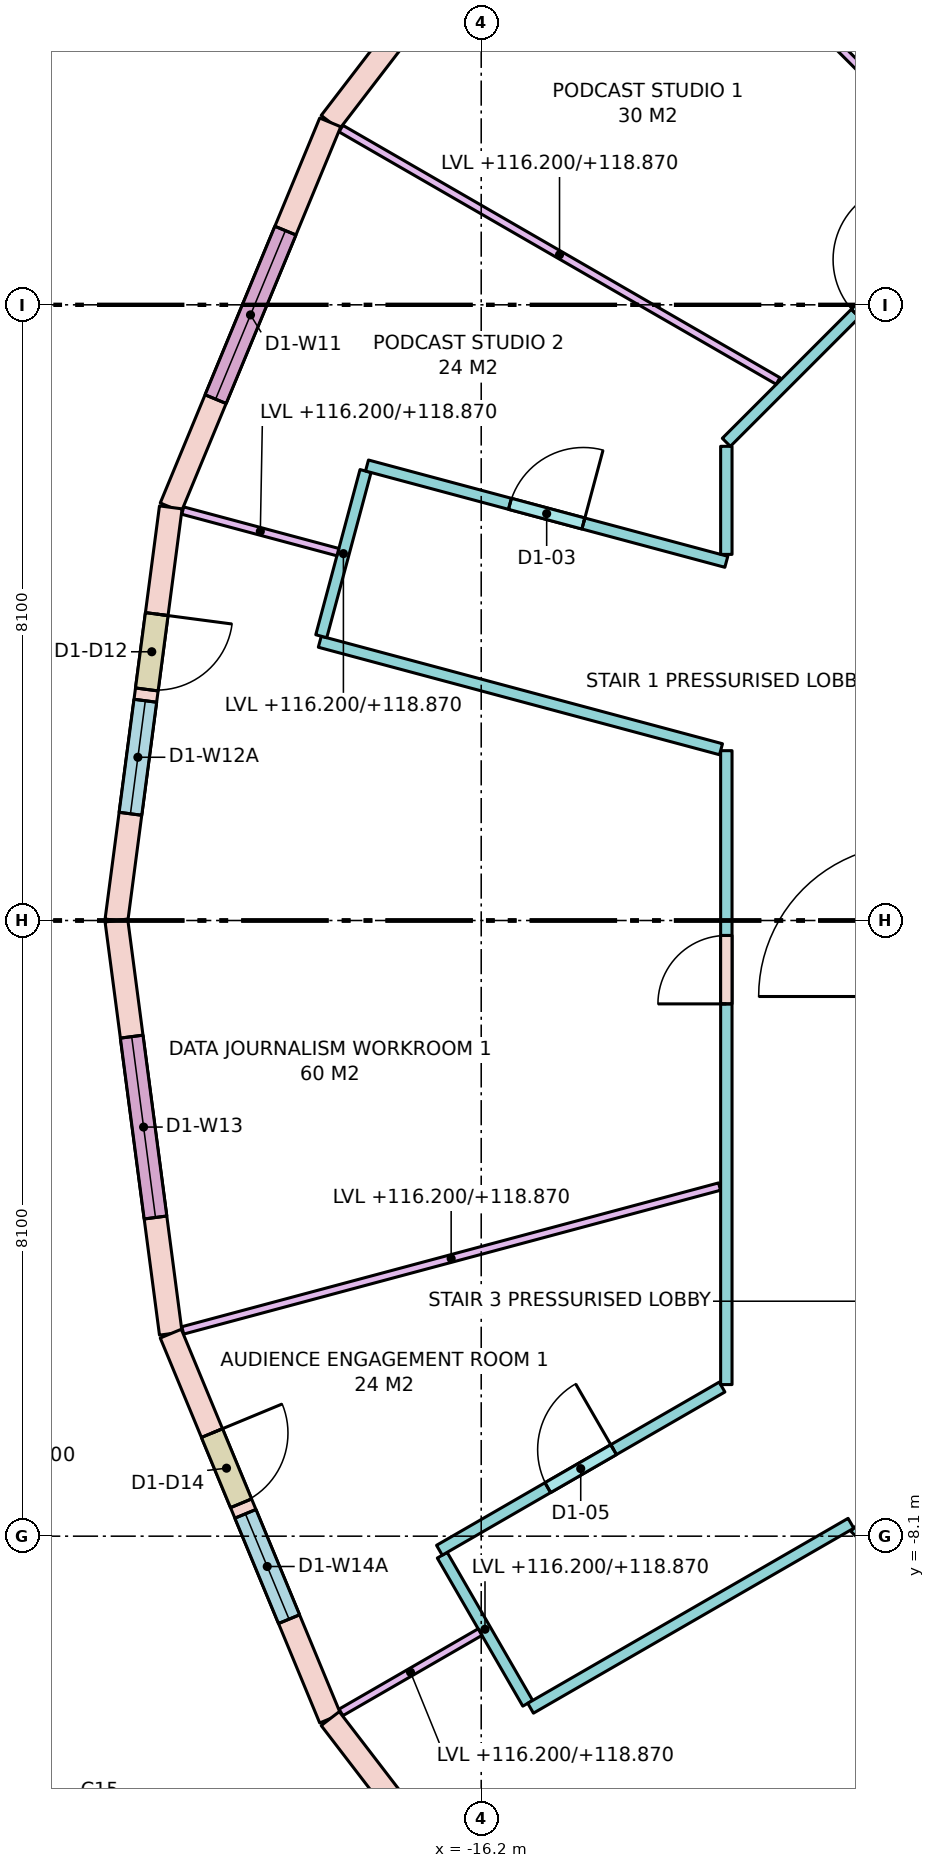
"""IFC4 building model, lengths in metres.
Left out: names, types, materials, properties, quantities, classifications, styles, units other than length and angle.
Written with IfcOpenShell. Run it as: python <this file> out.ifc"""

import sys

from ifc_helpers import new_model, si_unit, direction, frame, frame_2d, origin, place, context, subcontext, project, spatial, rectangle, extrude, element, fill, save


model = new_model("IFC4")
c1 = context("Model", 3, precision=1e-05, world=origin(), true_north=direction((0.0, 1.0)))
c2 = subcontext(c1, "Body", "Model", "MODEL_VIEW")
j1 = project(units=[si_unit("LENGTHUNIT", "METRE"), si_unit("PLANEANGLEUNIT", "RADIAN")], contexts=[c1])
p1 = place(None, origin())
s1 = spatial("IfcSite", under=j1, at=p1, CompositionType="ELEMENT")
p2 = place(p1, origin())
s2 = spatial("IfcBuilding", under=s1, at=p2, CompositionType="ELEMENT")
p3 = place(p2, frame((0.0, 0.0, 116.2)))
s3 = spatial("IfcBuildingStorey", under=s2, at=p3, CompositionType="ELEMENT", Elevation=116.2)
p4 = place(p3, frame((-14.849, 14.849, 0.0), z_axis=(0.0, 0.0, 1.0), x_axis=(-0.608784891166, -0.793335336593, 0.0)))
e1 = element("IfcWall", 1, at=p4, inside=s3, PredefinedType="STANDARD", context=c2, shape_type="SweptSolid", body=[
    extrude(rectangle(XDim=5.482, YDim=0.3, at=frame_2d((2.741, 0.0))), origin(), (0.0, 0.0, 1.0), 3.52),
])
p5 = place(p4, frame((1.416, 0.0, 0.0)))
e2 = element("IfcOpeningElement", 2, at=p5, cuts=e1, PredefinedType="OPENING", context=c2, shape_type="SweptSolid", body=[
    extrude(rectangle(XDim=1.0, YDim=2.4, at=frame_2d((0.5, 1.2))), frame((0.0, 0.16, 0.0), z_axis=(0.0, -1.0, 0.0), x_axis=(1.0, 0.0, 0.0)), (0.0, 0.0, 1.0), 0.32),
])
p6 = place(p4, frame((2.566, 0.0, 0.8)))
e3 = element("IfcOpeningElement", 3, at=p6, cuts=e1, PredefinedType="OPENING", context=c2, shape_type="SweptSolid", body=[
    extrude(rectangle(XDim=1.5, YDim=2.5, at=frame_2d((0.75, 1.25))), frame((0.0, 0.16, 0.0), z_axis=(0.0, -1.0, 0.0), x_axis=(1.0, 0.0, 0.0)), (0.0, 0.0, 1.0), 0.32),
])
p7 = place(p3, frame((-18.187, 10.5, 0.0), z_axis=(0.0, 0.0, 1.0), x_axis=(-0.382688740813, -0.923877333662, 0.0)))
e4 = element("IfcWall", 4, at=p7, inside=s3, PredefinedType="STANDARD", context=c2, shape_type="SweptSolid", body=[
    extrude(rectangle(XDim=5.482, YDim=0.3, at=frame_2d((2.741, 0.0))), origin(), (0.0, 0.0, 1.0), 3.52),
])
p8 = place(p7, frame((1.541, 0.0, 0.8)))
e5 = element("IfcOpeningElement", 5, at=p8, cuts=e4, PredefinedType="OPENING", context=c2, shape_type="SweptSolid", body=[
    extrude(rectangle(XDim=2.4, YDim=2.5, at=frame_2d((1.2, 1.25))), frame((0.0, 0.16, 0.0), z_axis=(0.0, -1.0, 0.0), x_axis=(1.0, 0.0, 0.0)), (0.0, 0.0, 1.0), 0.32),
])
p9 = place(p3, frame((-20.284, 5.435, 0.0), z_axis=(0.0, 0.0, 1.0), x_axis=(-0.130527087244, -0.991444743541, 0.0)))
e6 = element("IfcWall", 6, at=p9, inside=s3, PredefinedType="STANDARD", context=c2, shape_type="SweptSolid", body=[
    extrude(rectangle(XDim=5.482, YDim=0.3, at=frame_2d((2.741, 0.0))), origin(), (0.0, 0.0, 1.0), 3.52),
])
p10 = place(p9, frame((1.416, 0.0, 0.0)))
e7 = element("IfcOpeningElement", 7, at=p10, cuts=e6, PredefinedType="OPENING", context=c2, shape_type="SweptSolid", body=[
    extrude(rectangle(XDim=1.0, YDim=2.4, at=frame_2d((0.5, 1.2))), frame((0.0, 0.16, 0.0), z_axis=(0.0, -1.0, 0.0), x_axis=(1.0, 0.0, 0.0)), (0.0, 0.0, 1.0), 0.32),
])
p11 = place(p9, frame((2.566, 0.0, 0.8)))
e8 = element("IfcOpeningElement", 8, at=p11, cuts=e6, PredefinedType="OPENING", context=c2, shape_type="SweptSolid", body=[
    extrude(rectangle(XDim=1.5, YDim=2.5, at=frame_2d((0.75, 1.25))), frame((0.0, 0.16, 0.0), z_axis=(0.0, -1.0, 0.0), x_axis=(1.0, 0.0, 0.0)), (0.0, 0.0, 1.0), 0.32),
])
p12 = place(p3, frame((-21.0, 0.0, 0.0), z_axis=(0.0, 0.0, 1.0), x_axis=(0.130527087244, -0.991444743541, 0.0)))
e9 = element("IfcWall", 9, at=p12, inside=s3, PredefinedType="STANDARD", context=c2, shape_type="SweptSolid", body=[
    extrude(rectangle(XDim=5.482, YDim=0.3, at=frame_2d((2.741, 0.0))), origin(), (0.0, 0.0, 1.0), 3.52),
])
p13 = place(p12, frame((1.541, 0.0, 0.8)))
e10 = element("IfcOpeningElement", 10, at=p13, cuts=e9, PredefinedType="OPENING", context=c2, shape_type="SweptSolid", body=[
    extrude(rectangle(XDim=2.4, YDim=2.5, at=frame_2d((1.2, 1.25))), frame((0.0, 0.16, 0.0), z_axis=(0.0, -1.0, 0.0), x_axis=(1.0, 0.0, 0.0)), (0.0, 0.0, 1.0), 0.32),
])
p14 = place(p3, frame((-20.284, -5.435, 0.0), z_axis=(0.0, 0.0, 1.0), x_axis=(0.382688740813, -0.923877333662, 0.0)))
e11 = element("IfcWall", 11, at=p14, inside=s3, PredefinedType="STANDARD", context=c2, shape_type="SweptSolid", body=[
    extrude(rectangle(XDim=5.482, YDim=0.3, at=frame_2d((2.741, 0.0))), origin(), (0.0, 0.0, 1.0), 3.52),
])
p15 = place(p14, frame((1.416, 0.0, 0.0)))
e12 = element("IfcOpeningElement", 12, at=p15, cuts=e11, PredefinedType="OPENING", context=c2, shape_type="SweptSolid", body=[
    extrude(rectangle(XDim=1.0, YDim=2.4, at=frame_2d((0.5, 1.2))), frame((0.0, 0.16, 0.0), z_axis=(0.0, -1.0, 0.0), x_axis=(1.0, 0.0, 0.0)), (0.0, 0.0, 1.0), 0.32),
])
p16 = place(p14, frame((2.566, 0.0, 0.8)))
e13 = element("IfcOpeningElement", 13, at=p16, cuts=e11, PredefinedType="OPENING", context=c2, shape_type="SweptSolid", body=[
    extrude(rectangle(XDim=1.5, YDim=2.5, at=frame_2d((0.75, 1.25))), frame((0.0, 0.16, 0.0), z_axis=(0.0, -1.0, 0.0), x_axis=(1.0, 0.0, 0.0)), (0.0, 0.0, 1.0), 0.32),
])
p17 = place(p3, frame((-18.187, -10.5, 0.0), z_axis=(0.0, 0.0, 1.0), x_axis=(0.608784891166, -0.793335336593, 0.0)))
e14 = element("IfcWall", 14, at=p17, inside=s3, PredefinedType="STANDARD", context=c2, shape_type="SweptSolid", body=[
    extrude(rectangle(XDim=5.482, YDim=0.3, at=frame_2d((2.741, 0.0))), origin(), (0.0, 0.0, 1.0), 3.52),
])
p18 = place(p17, frame((1.541, 0.0, 0.8)))
e15 = element("IfcOpeningElement", 15, at=p18, cuts=e14, PredefinedType="OPENING", context=c2, shape_type="SweptSolid", body=[
    extrude(rectangle(XDim=2.4, YDim=2.5, at=frame_2d((1.2, 1.25))), frame((0.0, 0.16, 0.0), z_axis=(0.0, -1.0, 0.0), x_axis=(1.0, 0.0, 0.0)), (0.0, 0.0, 1.0), 0.32),
])
p19 = place(p3, frame((-15.588, -10.299, 0.0), z_axis=(0.0, 0.0, 1.0), x_axis=(-0.500013631625, 0.866017533419, 0.0)))
e16 = element("IfcWall", 16, at=p19, inside=s3, PredefinedType="PARTITIONING", context=c2, shape_type="SweptSolid", body=[
    extrude(rectangle(XDim=2.25, YDim=0.15, at=frame_2d((1.125, 0.0))), origin(), (0.0, 0.0, 1.0), 2.67),
])
p20 = place(p3, frame((-16.75, -8.285, 0.0), z_axis=(0.0, 0.0, 1.0), x_axis=(0.866019905438, 0.500009523294, 0.0)))
e17 = element("IfcWall", 17, at=p20, inside=s3, PredefinedType="PARTITIONING", context=c2, shape_type="SweptSolid", body=[
    extrude(rectangle(XDim=4.294, YDim=0.15, at=frame_2d((2.147, 0.0))), origin(), (0.0, 0.0, 1.0), 3.52),
])
p21 = place(p20, frame((1.647, 0.0, 0.0)))
e18 = element("IfcOpeningElement", 18, at=p21, cuts=e17, PredefinedType="OPENING", context=c2, shape_type="SweptSolid", body=[
    extrude(rectangle(XDim=1.0, YDim=2.1, at=frame_2d((0.5, 1.05))), frame((0.0, 0.085, 0.0), z_axis=(0.0, -1.0, 0.0), x_axis=(1.0, 0.0, 0.0)), (0.0, 0.0, 1.0), 0.17),
])
p22 = place(p3, frame((-12.975, -6.105, 0.0), z_axis=(0.0, 0.0, 1.0), x_axis=(0.0, 1.0, 0.0)))
e19 = element("IfcWall", 19, at=p22, inside=s3, PredefinedType="PARTITIONING", context=c2, shape_type="SweptSolid", body=[
    extrude(rectangle(XDim=8.34, YDim=0.15, at=frame_2d((4.17, 0.0))), origin(), (0.0, 0.0, 1.0), 2.67),
])
p23 = place(p22, frame((5.008, 0.0, 0.0)))
e20 = element("IfcOpeningElement", 20, at=p23, cuts=e19, PredefinedType="OPENING", context=c2, shape_type="SweptSolid", body=[
    extrude(rectangle(XDim=0.9, YDim=2.1, at=frame_2d((0.45, 1.05))), frame((0.0, 0.085, 0.0), z_axis=(0.0, -1.0, 0.0), x_axis=(1.0, 0.0, 0.0)), (0.0, 0.0, 1.0), 0.17),
])
p24 = place(p3, frame((-13.045, 2.253, 0.0), z_axis=(0.0, 0.0, 1.0), x_axis=(-0.965932498402, 0.258794143153, 0.0)))
e21 = element("IfcWall", 21, at=p24, inside=s3, PredefinedType="PARTITIONING", context=c2, shape_type="SweptSolid", body=[
    extrude(rectangle(XDim=5.465, YDim=0.15, at=frame_2d((2.732, 0.0))), origin(), (0.0, 0.0, 1.0), 3.52),
])
p25 = place(p3, frame((-18.304, 3.74, 0.0), z_axis=(0.0, 0.0, 1.0), x_axis=(0.25879032241, 0.965933522054, 0.0)))
e22 = element("IfcWall", 22, at=p25, inside=s3, PredefinedType="PARTITIONING", context=c2, shape_type="SweptSolid", body=[
    extrude(rectangle(XDim=2.25, YDim=0.15, at=frame_2d((1.125, 0.0))), origin(), (0.0, 0.0, 1.0), 2.67),
])
p26 = place(p3, frame((-17.703, 5.986, 0.0), z_axis=(0.0, 0.0, 1.0), x_axis=(0.965920440817, -0.258839143121, 0.0)))
e23 = element("IfcWall", 23, at=p26, inside=s3, PredefinedType="PARTITIONING", context=c2, shape_type="SweptSolid", body=[
    extrude(rectangle(XDim=4.894, YDim=0.15, at=frame_2d((2.447, 0.0))), origin(), (0.0, 0.0, 1.0), 3.52),
])
p27 = place(p26, frame((1.947, 0.0, 0.0)))
e24 = element("IfcOpeningElement", 24, at=p27, cuts=e23, PredefinedType="OPENING", context=c2, shape_type="SweptSolid", body=[
    extrude(rectangle(XDim=1.0, YDim=2.1, at=frame_2d((0.5, 1.05))), frame((0.0, 0.085, 0.0), z_axis=(0.0, -1.0, 0.0), x_axis=(1.0, 0.0, 0.0)), (0.0, 0.0, 1.0), 0.17),
])
p28 = place(p3, frame((-12.975, 4.816, 0.0), z_axis=(0.0, 0.0, 1.0), x_axis=(0.0, 1.0, 0.0)))
e25 = element("IfcWall", 25, at=p28, inside=s3, PredefinedType="PARTITIONING", context=c2, shape_type="SweptSolid", body=[
    extrude(rectangle(XDim=1.422, YDim=0.15, at=frame_2d((0.711, 0.0))), origin(), (0.0, 0.0, 1.0), 3.52),
])
p29 = place(p3, frame((-12.975, 6.291, 0.0), z_axis=(0.0, 0.0, 1.0), x_axis=(0.707125355289, 0.707088206597, 0.0)))
e26 = element("IfcWall", 26, at=p29, inside=s3, PredefinedType="PARTITIONING", context=c2, shape_type="SweptSolid", body=[
    extrude(rectangle(XDim=6.572, YDim=0.15, at=frame_2d((3.286, 0.0))), origin(), (0.0, 0.0, 1.0), 2.67),
])
p30 = place(p29, frame((2.4, 0.0, 0.0)))
e27 = element("IfcOpeningElement", 27, at=p30, cuts=e26, PredefinedType="OPENING", context=c2, shape_type="SweptSolid", body=[
    extrude(rectangle(XDim=1.0, YDim=2.1, at=frame_2d((0.5, 1.05))), frame((0.0, 0.085, 0.0), z_axis=(0.0, -1.0, 0.0), x_axis=(1.0, 0.0, 0.0)), (0.0, 0.0, 1.0), 0.17),
])
p31 = place(p3, frame((-8.328, -10.938, 0.0), z_axis=(0.0, 0.0, 1.0), x_axis=(-0.707077584218, 0.707135976949, 0.0)))
e28 = element("IfcWall", 28, at=p31, inside=s3, PredefinedType="PARTITIONING", context=c2, shape_type="SweptSolid", body=[
    extrude(rectangle(XDim=4.181, YDim=0.15, at=frame_2d((2.09, 0.0))), origin(), (0.0, 0.0, 1.0), 2.67),
])
p32 = place(p3, frame((-11.336, -7.93, 0.0), z_axis=(0.0, 0.0, 1.0), x_axis=(-0.866042731792, -0.49996998581, 0.0)))
e29 = element("IfcWall", 29, at=p32, inside=s3, PredefinedType="PARTITIONING", context=c2, shape_type="SweptSolid", body=[
    extrude(rectangle(XDim=4.866, YDim=0.15, at=frame_2d((2.433, 0.0))), origin(), (0.0, 0.0, 1.0), 3.52),
])
p33 = place(p3, frame((-9.686, 9.686, 0.0), z_axis=(0.0, 0.0, 1.0), x_axis=(-0.707106781187, 0.707106781187, 0.0)))
e30 = element("IfcWall", 30, at=p33, inside=s3, PredefinedType="PARTITIONING", context=c2, shape_type="SweptSolid", body=[
    extrude(rectangle(XDim=7.139, YDim=0.1, at=frame_2d((3.569, 0.0))), origin(), (0.0, 0.0, 1.0), 2.67),
])
p34 = place(p3, frame((-12.294, 7.098, 0.0), z_axis=(0.0, 0.0, 1.0), x_axis=(-0.866010486135, 0.500025837236, 0.0)))
e31 = element("IfcWall", 31, at=p34, inside=s3, PredefinedType="PARTITIONING", context=c2, shape_type="SweptSolid", body=[
    extrude(rectangle(XDim=6.641, YDim=0.1, at=frame_2d((3.32, 0.0))), origin(), (0.0, 0.0, 1.0), 2.67),
])
p35 = place(p3, frame((-18.086, 4.846, 0.0), z_axis=(0.0, 0.0, 1.0), x_axis=(-0.965956301772, 0.258705282257, 0.0)))
e32 = element("IfcWall", 32, at=p35, inside=s3, PredefinedType="PARTITIONING", context=c2, shape_type="SweptSolid", body=[
    extrude(rectangle(XDim=2.113, YDim=0.1, at=frame_2d((1.057, 0.0))), origin(), (0.0, 0.0, 1.0), 2.67),
])
p36 = place(p3, frame((-13.064, -3.5, 0.0), z_axis=(0.0, 0.0, 1.0), x_axis=(-0.965927781613, -0.258811747624, 0.0)))
e33 = element("IfcWall", 33, at=p36, inside=s3, PredefinedType="PARTITIONING", context=c2, shape_type="SweptSolid", body=[
    extrude(rectangle(XDim=7.312, YDim=0.1, at=frame_2d((3.656, 0.0))), origin(), (0.0, 0.0, 1.0), 2.67),
])
p37 = place(p3, frame((-16.215, -9.362, 0.0), z_axis=(0.0, 0.0, 1.0), x_axis=(-0.866016279763, -0.500015802937, 0.0)))
e34 = element("IfcWall", 34, at=p37, inside=s3, PredefinedType="PARTITIONING", context=c2, shape_type="SweptSolid", body=[
    extrude(rectangle(XDim=2.113, YDim=0.1, at=frame_2d((1.057, 0.0))), origin(), (0.0, 0.0, 1.0), 2.67),
])
p38 = place(p8, origin())
e35 = element("IfcWindow", 35, at=p38, inside=s3, PartitioningType="SINGLE_PANEL", PredefinedType="WINDOW", context=c2, shape_type="SweptSolid", body=[
    extrude(rectangle(XDim=2.4, YDim=2.5, at=frame_2d((1.2, 1.25))), frame((0.0, 0.03, 0.0), z_axis=(0.0, -1.0, 0.0), x_axis=(1.0, 0.0, 0.0)), (0.0, 0.0, 1.0), 0.06),
])
fill(e5, e35)
p39 = place(p10, origin())
e36 = element("IfcDoor", 36, at=p39, inside=s3, OperationType="SINGLE_SWING_LEFT", PredefinedType="DOOR", context=c2, shape_type="SweptSolid", body=[
    extrude(rectangle(XDim=1.0, YDim=2.4, at=frame_2d((0.5, 1.2))), frame((0.0, 0.025, 0.0), z_axis=(0.0, -1.0, 0.0), x_axis=(1.0, 0.0, 0.0)), (0.0, 0.0, 1.0), 0.05),
])
fill(e7, e36)
p40 = place(p11, origin())
e37 = element("IfcWindow", 37, at=p40, inside=s3, PartitioningType="SINGLE_PANEL", PredefinedType="WINDOW", context=c2, shape_type="SweptSolid", body=[
    extrude(rectangle(XDim=1.5, YDim=2.5, at=frame_2d((0.75, 1.25))), frame((0.0, 0.03, 0.0), z_axis=(0.0, -1.0, 0.0), x_axis=(1.0, 0.0, 0.0)), (0.0, 0.0, 1.0), 0.06),
])
fill(e8, e37)
p41 = place(p13, origin())
e38 = element("IfcWindow", 38, at=p41, inside=s3, PartitioningType="SINGLE_PANEL", PredefinedType="WINDOW", context=c2, shape_type="SweptSolid", body=[
    extrude(rectangle(XDim=2.4, YDim=2.5, at=frame_2d((1.2, 1.25))), frame((0.0, 0.03, 0.0), z_axis=(0.0, -1.0, 0.0), x_axis=(1.0, 0.0, 0.0)), (0.0, 0.0, 1.0), 0.06),
])
fill(e10, e38)
p42 = place(p15, origin())
e39 = element("IfcDoor", 39, at=p42, inside=s3, OperationType="SINGLE_SWING_LEFT", PredefinedType="DOOR", context=c2, shape_type="SweptSolid", body=[
    extrude(rectangle(XDim=1.0, YDim=2.4, at=frame_2d((0.5, 1.2))), frame((0.0, 0.025, 0.0), z_axis=(0.0, -1.0, 0.0), x_axis=(1.0, 0.0, 0.0)), (0.0, 0.0, 1.0), 0.05),
])
fill(e12, e39)
p43 = place(p16, origin())
e40 = element("IfcWindow", 40, at=p43, inside=s3, PartitioningType="SINGLE_PANEL", PredefinedType="WINDOW", context=c2, shape_type="SweptSolid", body=[
    extrude(rectangle(XDim=1.5, YDim=2.5, at=frame_2d((0.75, 1.25))), frame((0.0, 0.03, 0.0), z_axis=(0.0, -1.0, 0.0), x_axis=(1.0, 0.0, 0.0)), (0.0, 0.0, 1.0), 0.06),
])
fill(e13, e40)
p44 = place(p30, origin())
e41 = element("IfcDoor", 41, at=p44, inside=s3, OperationType="SINGLE_SWING_RIGHT", PredefinedType="DOOR", context=c2, shape_type="SweptSolid", body=[
    extrude(rectangle(XDim=1.0, YDim=2.1, at=frame_2d((0.5, 1.05))), frame((0.0, 0.025, 0.0), z_axis=(0.0, -1.0, 0.0), x_axis=(1.0, 0.0, 0.0)), (0.0, 0.0, 1.0), 0.05),
])
fill(e27, e41)
p45 = place(p27, origin())
e42 = element("IfcDoor", 42, at=p45, inside=s3, OperationType="SINGLE_SWING_RIGHT", PredefinedType="DOOR", context=c2, shape_type="SweptSolid", body=[
    extrude(rectangle(XDim=1.0, YDim=2.1, at=frame_2d((0.5, 1.05))), frame((0.0, 0.025, 0.0), z_axis=(0.0, -1.0, 0.0), x_axis=(1.0, 0.0, 0.0)), (0.0, 0.0, 1.0), 0.05),
])
fill(e24, e42)
p46 = place(p23, origin())
e43 = element("IfcDoor", 43, at=p46, inside=s3, OperationType="SINGLE_SWING_LEFT", PredefinedType="DOOR", context=c2, shape_type="SweptSolid", body=[
    extrude(rectangle(XDim=0.9, YDim=2.1, at=frame_2d((0.45, 1.05))), frame((0.0, 0.025, 0.0), z_axis=(0.0, -1.0, 0.0), x_axis=(1.0, 0.0, 0.0)), (0.0, 0.0, 1.0), 0.05),
])
fill(e20, e43)
p47 = place(p21, origin())
e44 = element("IfcDoor", 44, at=p47, inside=s3, OperationType="SINGLE_SWING_RIGHT", PredefinedType="DOOR", context=c2, shape_type="SweptSolid", body=[
    extrude(rectangle(XDim=1.0, YDim=2.1, at=frame_2d((0.5, 1.05))), frame((0.0, 0.025, 0.0), z_axis=(0.0, -1.0, 0.0), x_axis=(1.0, 0.0, 0.0)), (0.0, 0.0, 1.0), 0.05),
])
fill(e18, e44)
save(model, sys.argv[1])
